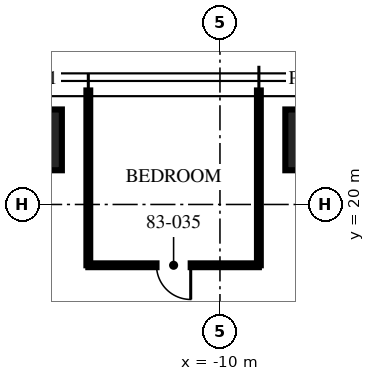
"""IFC4 building model, lengths in metres.
Left out: names, types, materials, properties, quantities, classifications, styles, units other than length and angle.
Written with IfcOpenShell. Run it as: python <this file> out.ifc"""

import sys

from ifc_helpers import new_model, si_unit, direction, frame, frame_2d, origin, origin_2d, place, context, subcontext, project, spatial, rectangle, extrude, element, fill, save


model = new_model("IFC4")
c1 = context("Model", 3, precision=1e-05, world=origin(), true_north=direction((0.0, 1.0)))
c2 = subcontext(c1, "Body", "Model", "MODEL_VIEW")
j1 = project(units=[si_unit("LENGTHUNIT", "METRE"), si_unit("PLANEANGLEUNIT", "RADIAN")], contexts=[c1])
p1 = place(None, origin())
s1 = spatial("IfcSite", under=j1, at=p1, CompositionType="ELEMENT")
p2 = place(p1, origin())
s2 = spatial("IfcBuilding", under=s1, at=p2, CompositionType="ELEMENT")
p3 = place(p2, frame((0.0, 0.0, 330.75)))
s3 = spatial("IfcBuildingStorey", under=s2, at=p3, CompositionType="ELEMENT", Elevation=330.75)
for number, where, z_axis, x_axis in (
    (1, (-14.96, 21.7, 0.0), (0.0, 0.0, 1.0), (1.0, 0.0, 0.0)),
    (2, (-7.48, 21.7, 0.0), (0.0, 0.0, 1.0), (1.0, 0.0, 0.0)),
):
    element("IfcColumn", number, at=place(p3, frame(where, z_axis=z_axis, x_axis=x_axis)), inside=s3, PredefinedType="COLUMN", context=c2, shape_type="SweptSolid", body=[
        extrude(rectangle(XDim=1.6, YDim=1.6, at=origin_2d()), origin(), (0.0, 0.0, 1.0), 3.75),
    ])
for number, where, z_axis, x_axis in (
    (3, (-8.976, 18.4, 0.0), (0.0, 0.0, 1.0), (0.0, 1.0, 0.0)),
    (4, (-13.464, 18.4, 0.0), (0.0, 0.0, 1.0), (0.0, 1.0, 0.0)),
):
    element("IfcWall", number, at=place(p3, frame(where, z_axis=z_axis, x_axis=x_axis)), inside=s3, PredefinedType="PARTITIONING", context=c2, shape_type="SweptSolid", body=[
        extrude(rectangle(XDim=4.6, YDim=0.1, at=frame_2d((2.3, 0.0))), origin(), (0.0, 0.0, 1.0), 3.01),
    ])
p4 = place(p3, frame((-8.976, 18.4, 0.0), z_axis=(0.0, 0.0, 1.0), x_axis=(-1.0, 0.0, 0.0)))
e5 = element("IfcWall", 5, at=p4, inside=s3, PredefinedType="PARTITIONING", context=c2, shape_type="SweptSolid", body=[
    extrude(rectangle(XDim=4.488, YDim=0.1, at=frame_2d((2.244, 0.0))), origin(), (0.0, 0.0, 1.0), 2.91),
])
p5 = place(p4, frame((1.794, 0.0, 0.0)))
e6 = element("IfcOpeningElement", 6, at=p5, cuts=e5, PredefinedType="OPENING", context=c2, shape_type="SweptSolid", body=[
    extrude(rectangle(XDim=0.9, YDim=2.1, at=frame_2d((0.45, 1.05))), frame((0.0, 0.06, 0.0), z_axis=(0.0, -1.0, 0.0), x_axis=(1.0, 0.0, 0.0)), (0.0, 0.0, 1.0), 0.12),
])
p6 = place(p5, origin())
e7 = element("IfcDoor", 7, at=p6, inside=s3, OperationType="SINGLE_SWING_LEFT", PredefinedType="DOOR", context=c2, shape_type="SweptSolid", body=[
    extrude(rectangle(XDim=0.9, YDim=2.1, at=frame_2d((0.45, 1.05))), frame((0.0, 0.025, 0.0), z_axis=(0.0, -1.0, 0.0), x_axis=(1.0, 0.0, 0.0)), (0.0, 0.0, 1.0), 0.05),
])
fill(e6, e7)
save(model, sys.argv[1])
